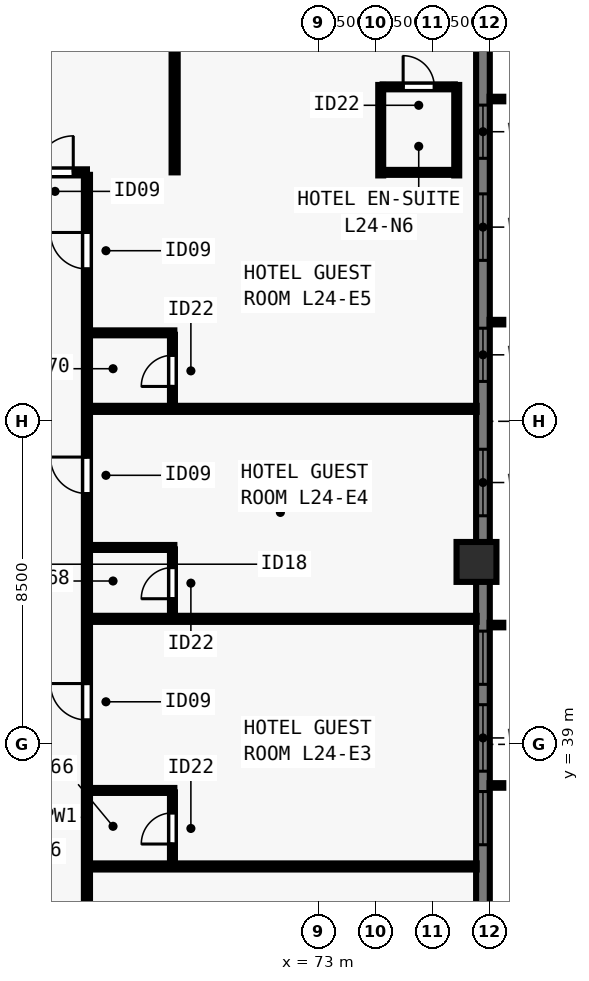
"""IFC4 building model, lengths in metres.
Left out: names, types, materials, properties, quantities, classifications, styles, units other than length and angle.
Written with IfcOpenShell. Run it as: python <this file> out.ifc"""

import sys

from ifc_helpers import new_model, si_unit, direction, frame, frame_2d, origin, origin_2d, place, context, subcontext, project, spatial, rectangle, extrude, element, fill, save


model = new_model("IFC4")
c1 = context("Model", 3, precision=1e-05, world=origin(), true_north=direction((0.0, 1.0)))
c2 = subcontext(c1, "Body", "Model", "MODEL_VIEW")
j1 = project(units=[si_unit("LENGTHUNIT", "METRE"), si_unit("PLANEANGLEUNIT", "RADIAN")], contexts=[c1])
p1 = place(None, origin())
s1 = spatial("IfcSite", under=j1, at=p1, CompositionType="ELEMENT")
p2 = place(p1, origin())
s2 = spatial("IfcBuilding", under=s1, at=p2, CompositionType="ELEMENT")
p3 = place(p2, frame((0.0, 0.0, 90.0)))
s3 = spatial("IfcBuildingStorey", under=s2, at=p3, CompositionType="ELEMENT", Elevation=90.0)
p4 = place(p3, frame((77.15, 43.8, 0.0), z_axis=(0.0, 0.0, 1.0), x_axis=(0.0, 1.0, 0.0)))
e1 = element("IfcColumn", 1, at=p4, inside=s3, PredefinedType="COLUMN", context=c2, shape_type="SweptSolid", body=[
    extrude(rectangle(XDim=1.05, YDim=1.05, at=origin_2d()), origin(), (0.0, 0.0, 1.0), 3.5),
])
p5 = place(p3, frame((77.32, 61.5, 0.0), z_axis=(0.0, 0.0, 1.0), x_axis=(0.0, -1.0, 0.0)))
e2 = element("IfcWall", 2, at=p5, inside=s3, PredefinedType="SOLIDWALL", context=c2, shape_type="SweptSolid", body=[
    extrude(rectangle(XDim=44.662, YDim=0.36, at=frame_2d((22.331, 0.0))), origin(), (0.0, 0.0, 1.0), 3.28),
])
p6 = place(p5, frame((5.68, 0.0, 0.8)))
e3 = element("IfcOpeningElement", 3, at=p6, cuts=e2, PredefinedType="OPENING", context=c2, shape_type="SweptSolid", body=[
    extrude(rectangle(XDim=1.4, YDim=1.544, at=frame_2d((0.7, 0.772))), frame((0.0, 0.19, 0.0), z_axis=(0.0, -1.0, 0.0), x_axis=(1.0, 0.0, 0.0)), (0.0, 0.0, 1.0), 0.38),
])
p7 = place(p5, frame((8.015, 0.0, 0.8)))
e4 = element("IfcOpeningElement", 4, at=p7, cuts=e2, PredefinedType="OPENING", context=c2, shape_type="SweptSolid", body=[
    extrude(rectangle(XDim=1.75, YDim=1.544, at=frame_2d((0.875, 0.772))), frame((0.0, 0.19, 0.0), z_axis=(0.0, -1.0, 0.0), x_axis=(1.0, 0.0, 0.0)), (0.0, 0.0, 1.0), 0.38),
])
p8 = place(p5, frame((11.551, 0.0, 0.8)))
e5 = element("IfcOpeningElement", 5, at=p8, cuts=e2, PredefinedType="OPENING", context=c2, shape_type="SweptSolid", body=[
    extrude(rectangle(XDim=1.4, YDim=1.544, at=frame_2d((0.7, 0.772))), frame((0.0, 0.19, 0.0), z_axis=(0.0, -1.0, 0.0), x_axis=(1.0, 0.0, 0.0)), (0.0, 0.0, 1.0), 0.38),
])
p9 = place(p5, frame((14.736, 0.0, 0.8)))
e6 = element("IfcOpeningElement", 6, at=p9, cuts=e2, PredefinedType="OPENING", context=c2, shape_type="SweptSolid", body=[
    extrude(rectangle(XDim=1.75, YDim=1.544, at=frame_2d((0.875, 0.772))), frame((0.0, 0.19, 0.0), z_axis=(0.0, -1.0, 0.0), x_axis=(1.0, 0.0, 0.0)), (0.0, 0.0, 1.0), 0.38),
])
p10 = place(p5, frame((19.521, 0.0, 0.8)))
e7 = element("IfcOpeningElement", 7, at=p10, cuts=e2, PredefinedType="OPENING", context=c2, shape_type="SweptSolid", body=[
    extrude(rectangle(XDim=1.4, YDim=1.544, at=frame_2d((0.7, 0.772))), frame((0.0, 0.19, 0.0), z_axis=(0.0, -1.0, 0.0), x_axis=(1.0, 0.0, 0.0)), (0.0, 0.0, 1.0), 0.38),
])
p11 = place(p5, frame((21.456, 0.0, 0.8)))
e8 = element("IfcOpeningElement", 8, at=p11, cuts=e2, PredefinedType="OPENING", context=c2, shape_type="SweptSolid", body=[
    extrude(rectangle(XDim=1.75, YDim=1.544, at=frame_2d((0.875, 0.772))), frame((0.0, 0.19, 0.0), z_axis=(0.0, -1.0, 0.0), x_axis=(1.0, 0.0, 0.0)), (0.0, 0.0, 1.0), 0.38),
])
p12 = place(p5, frame((23.741, 0.0, 0.8)))
e9 = element("IfcOpeningElement", 9, at=p12, cuts=e2, PredefinedType="OPENING", context=c2, shape_type="SweptSolid", body=[
    extrude(rectangle(XDim=1.4, YDim=1.544, at=frame_2d((0.7, 0.772))), frame((0.0, 0.19, 0.0), z_axis=(0.0, -1.0, 0.0), x_axis=(1.0, 0.0, 0.0)), (0.0, 0.0, 1.0), 0.38),
])
p13 = place(p5, frame((28.177, 0.0, 0.8)))
e10 = element("IfcOpeningElement", 10, at=p13, cuts=e2, PredefinedType="OPENING", context=c2, shape_type="SweptSolid", body=[
    extrude(rectangle(XDim=1.75, YDim=1.544, at=frame_2d((0.875, 0.772))), frame((0.0, 0.19, 0.0), z_axis=(0.0, -1.0, 0.0), x_axis=(1.0, 0.0, 0.0)), (0.0, 0.0, 1.0), 0.38),
])
p14 = place(p5, frame((31.711, 0.0, 0.8)))
e11 = element("IfcOpeningElement", 11, at=p14, cuts=e2, PredefinedType="OPENING", context=c2, shape_type="SweptSolid", body=[
    extrude(rectangle(XDim=1.4, YDim=1.544, at=frame_2d((0.7, 0.772))), frame((0.0, 0.19, 0.0), z_axis=(0.0, -1.0, 0.0), x_axis=(1.0, 0.0, 0.0)), (0.0, 0.0, 1.0), 0.38),
])
p15 = place(p5, frame((34.897, 0.0, 0.8)))
e12 = element("IfcOpeningElement", 12, at=p15, cuts=e2, PredefinedType="OPENING", context=c2, shape_type="SweptSolid", body=[
    extrude(rectangle(XDim=1.75, YDim=1.544, at=frame_2d((0.875, 0.772))), frame((0.0, 0.19, 0.0), z_axis=(0.0, -1.0, 0.0), x_axis=(1.0, 0.0, 0.0)), (0.0, 0.0, 1.0), 0.38),
])
p16 = place(p5, frame((38.432, 0.0, 0.8)))
e13 = element("IfcOpeningElement", 13, at=p16, cuts=e2, PredefinedType="OPENING", context=c2, shape_type="SweptSolid", body=[
    extrude(rectangle(XDim=1.4, YDim=1.544, at=frame_2d((0.7, 0.772))), frame((0.0, 0.19, 0.0), z_axis=(0.0, -1.0, 0.0), x_axis=(1.0, 0.0, 0.0)), (0.0, 0.0, 1.0), 0.38),
])
p17 = place(p3, frame((37.1, 54.05, 0.0), z_axis=(0.0, 0.0, 1.0), x_axis=(1.0, 0.0, 0.0)))
e14 = element("IfcWall", 14, at=p17, inside=s3, PredefinedType="PARTITIONING", context=c2, shape_type="SweptSolid", body=[
    extrude(rectangle(XDim=29.8, YDim=0.16, at=frame_2d((14.9, 0.0))), origin(), (0.0, 0.0, 1.0), 3.28),
])
p18 = place(p17, frame((0.91, 0.0, 0.0)))
e15 = element("IfcOpeningElement", 15, at=p18, cuts=e14, PredefinedType="OPENING", context=c2, shape_type="SweptSolid", body=[
    extrude(rectangle(XDim=0.96, YDim=2.15, at=frame_2d((0.48, 1.075))), frame((0.0, 0.09, 0.0), z_axis=(0.0, -1.0, 0.0), x_axis=(1.0, 0.0, 0.0)), (0.0, 0.0, 1.0), 0.18),
])
p19 = place(p17, frame((3.03, 0.0, 0.0)))
e16 = element("IfcOpeningElement", 16, at=p19, cuts=e14, PredefinedType="OPENING", context=c2, shape_type="SweptSolid", body=[
    extrude(rectangle(XDim=0.96, YDim=2.15, at=frame_2d((0.48, 1.075))), frame((0.0, 0.09, 0.0), z_axis=(0.0, -1.0, 0.0), x_axis=(1.0, 0.0, 0.0)), (0.0, 0.0, 1.0), 0.18),
])
p20 = place(p17, frame((11.39, 0.0, 0.0)))
e17 = element("IfcOpeningElement", 17, at=p20, cuts=e14, PredefinedType="OPENING", context=c2, shape_type="SweptSolid", body=[
    extrude(rectangle(XDim=0.96, YDim=2.15, at=frame_2d((0.48, 1.075))), frame((0.0, 0.09, 0.0), z_axis=(0.0, -1.0, 0.0), x_axis=(1.0, 0.0, 0.0)), (0.0, 0.0, 1.0), 0.18),
])
p21 = place(p17, frame((19.75, 0.0, 0.0)))
e18 = element("IfcOpeningElement", 18, at=p21, cuts=e14, PredefinedType="OPENING", context=c2, shape_type="SweptSolid", body=[
    extrude(rectangle(XDim=0.96, YDim=2.15, at=frame_2d((0.48, 1.075))), frame((0.0, 0.09, 0.0), z_axis=(0.0, -1.0, 0.0), x_axis=(1.0, 0.0, 0.0)), (0.0, 0.0, 1.0), 0.18),
])
p22 = place(p17, frame((26.931, 0.0, 0.0)))
e19 = element("IfcOpeningElement", 19, at=p22, cuts=e14, PredefinedType="OPENING", context=c2, shape_type="SweptSolid", body=[
    extrude(rectangle(XDim=0.96, YDim=2.15, at=frame_2d((0.48, 1.075))), frame((0.0, 0.09, 0.0), z_axis=(0.0, -1.0, 0.0), x_axis=(1.0, 0.0, 0.0)), (0.0, 0.0, 1.0), 0.18),
])
p23 = place(p17, frame((28.48, 0.0, 0.0)))
e20 = element("IfcOpeningElement", 20, at=p23, cuts=e14, PredefinedType="OPENING", context=c2, shape_type="SweptSolid", body=[
    extrude(rectangle(XDim=0.96, YDim=2.15, at=frame_2d((0.48, 1.075))), frame((0.0, 0.09, 0.0), z_axis=(0.0, -1.0, 0.0), x_axis=(1.0, 0.0, 0.0)), (0.0, 0.0, 1.0), 0.18),
])
p24 = place(p3, frame((66.9, 24.015, 0.0), z_axis=(0.0, 0.0, 1.0), x_axis=(0.0, 1.0, 0.0)))
e21 = element("IfcWall", 21, at=p24, inside=s3, PredefinedType="PARTITIONING", context=c2, shape_type="SweptSolid", body=[
    extrude(rectangle(XDim=29.97, YDim=0.16, at=frame_2d((14.985, 0.0))), origin(), (0.0, 0.0, 1.0), 3.28),
])
p25 = place(p24, frame((3.911, 0.0, 0.0)))
e22 = element("IfcOpeningElement", 22, at=p25, cuts=e21, PredefinedType="OPENING", context=c2, shape_type="SweptSolid", body=[
    extrude(rectangle(XDim=0.96, YDim=2.15, at=frame_2d((0.48, 1.075))), frame((0.0, 0.09, 0.0), z_axis=(0.0, -1.0, 0.0), x_axis=(1.0, 0.0, 0.0)), (0.0, 0.0, 1.0), 0.18),
])
p26 = place(p24, frame((9.544, 0.0, 0.0)))
e23 = element("IfcOpeningElement", 23, at=p26, cuts=e21, PredefinedType="OPENING", context=c2, shape_type="SweptSolid", body=[
    extrude(rectangle(XDim=0.96, YDim=2.15, at=frame_2d((0.48, 1.075))), frame((0.0, 0.09, 0.0), z_axis=(0.0, -1.0, 0.0), x_axis=(1.0, 0.0, 0.0)), (0.0, 0.0, 1.0), 0.18),
])
p27 = place(p24, frame((15.625, 0.0, 0.0)))
e24 = element("IfcOpeningElement", 24, at=p27, cuts=e21, PredefinedType="OPENING", context=c2, shape_type="SweptSolid", body=[
    extrude(rectangle(XDim=0.96, YDim=2.15, at=frame_2d((0.48, 1.075))), frame((0.0, 0.09, 0.0), z_axis=(0.0, -1.0, 0.0), x_axis=(1.0, 0.0, 0.0)), (0.0, 0.0, 1.0), 0.18),
])
p28 = place(p24, frame((21.584, 0.0, 0.0)))
e25 = element("IfcOpeningElement", 25, at=p28, cuts=e21, PredefinedType="OPENING", context=c2, shape_type="SweptSolid", body=[
    extrude(rectangle(XDim=0.96, YDim=2.15, at=frame_2d((0.48, 1.075))), frame((0.0, 0.09, 0.0), z_axis=(0.0, -1.0, 0.0), x_axis=(1.0, 0.0, 0.0)), (0.0, 0.0, 1.0), 0.18),
])
p29 = place(p24, frame((27.494, 0.0, 0.0)))
e26 = element("IfcOpeningElement", 26, at=p29, cuts=e21, PredefinedType="OPENING", context=c2, shape_type="SweptSolid", body=[
    extrude(rectangle(XDim=0.96, YDim=2.15, at=frame_2d((0.48, 1.075))), frame((0.0, 0.09, 0.0), z_axis=(0.0, -1.0, 0.0), x_axis=(1.0, 0.0, 0.0)), (0.0, 0.0, 1.0), 0.18),
])
p30 = place(p3, frame((69.208, 54.05, 0.0), z_axis=(0.0, 0.0, 1.0), x_axis=(0.0, 1.0, 0.0)))
e27 = element("IfcWall", 27, at=p30, inside=s3, PredefinedType="PARTITIONING", context=c2, shape_type="SweptSolid", body=[
    extrude(rectangle(XDim=10.105, YDim=0.16, at=frame_2d((5.052, 0.0))), origin(), (0.0, 0.0, 1.0), 2.439),
])
for number, where, z_axis, x_axis in (
    (28, (76.63, 53.97, 0.0), (0.0, 0.0, 1.0), (0.0, 1.0, 0.0)),
    (29, (74.63, 53.97, 0.0), (0.0, 0.0, 1.0), (0.0, 1.0, 0.0)),
):
    element("IfcWall", number, at=place(p3, frame(where, z_axis=z_axis, x_axis=x_axis)), inside=s3, PredefinedType="PLUMBINGWALL", context=c2, shape_type="SweptSolid", body=[
        extrude(rectangle(XDim=2.38, YDim=0.13, at=frame_2d((1.19, 0.0))), origin(), (0.0, 0.0, 1.0), 3.28),
    ])
p31 = place(p3, frame((74.68, 56.3, 0.0), z_axis=(0.0, 0.0, 1.0), x_axis=(1.0, 0.0, 0.0)))
e30 = element("IfcWall", 30, at=p31, inside=s3, PredefinedType="PLUMBINGWALL", context=c2, shape_type="SweptSolid", body=[
    extrude(rectangle(XDim=1.9, YDim=0.13, at=frame_2d((0.95, 0.0))), origin(), (0.0, 0.0, 1.0), 3.28),
])
p32 = place(p31, frame((0.54, 0.0, 0.0)))
e31 = element("IfcOpeningElement", 31, at=p32, cuts=e30, PredefinedType="OPENING", context=c2, shape_type="SweptSolid", body=[
    extrude(rectangle(XDim=0.82, YDim=2.1, at=frame_2d((0.41, 1.05))), frame((0.0, 0.075, 0.0), z_axis=(0.0, -1.0, 0.0), x_axis=(1.0, 0.0, 0.0)), (0.0, 0.0, 1.0), 0.15),
])
p33 = place(p3, frame((74.68, 54.05, 0.0), z_axis=(0.0, 0.0, 1.0), x_axis=(1.0, 0.0, 0.0)))
e32 = element("IfcWall", 32, at=p33, inside=s3, PredefinedType="PLUMBINGWALL", context=c2, shape_type="SweptSolid", body=[
    extrude(rectangle(XDim=1.9, YDim=0.13, at=frame_2d((0.95, 0.0))), origin(), (0.0, 0.0, 1.0), 3.28),
])
p34 = place(p3, frame((66.965, 35.788, 0.0), z_axis=(0.0, 0.0, 1.0), x_axis=(1.0, 0.0, 0.0)))
e33 = element("IfcWall", 33, at=p34, inside=s3, PredefinedType="PARTITIONING", context=c2, shape_type="SweptSolid", body=[
    extrude(rectangle(XDim=10.19, YDim=0.16, at=frame_2d((5.095, 0.0))), origin(), (0.0, 0.0, 1.0), 3.28),
])
p35 = place(p3, frame((66.965, 37.788, 0.0), z_axis=(0.0, 0.0, 1.0), x_axis=(1.0, 0.0, 0.0)))
e34 = element("IfcWall", 34, at=p35, inside=s3, PredefinedType="PLUMBINGWALL", context=c2, shape_type="SweptSolid", body=[
    extrude(rectangle(XDim=2.235, YDim=0.13, at=frame_2d((1.117, 0.0))), origin(), (0.0, 0.0, 1.0), 3.28),
])
p36 = place(p3, frame((69.15, 35.853, 0.0), z_axis=(0.0, 0.0, 1.0), x_axis=(0.0, 1.0, 0.0)))
e35 = element("IfcWall", 35, at=p36, inside=s3, PredefinedType="PLUMBINGWALL", context=c2, shape_type="SweptSolid", body=[
    extrude(rectangle(XDim=1.885, YDim=0.13, at=frame_2d((0.942, 0.0))), origin(), (0.0, 0.0, 1.0), 3.28),
])
p37 = place(p36, frame((0.525, 0.0, 0.0)))
e36 = element("IfcOpeningElement", 36, at=p37, cuts=e35, PredefinedType="OPENING", context=c2, shape_type="SweptSolid", body=[
    extrude(rectangle(XDim=0.82, YDim=2.1, at=frame_2d((0.41, 1.05))), frame((0.0, 0.075, 0.0), z_axis=(0.0, -1.0, 0.0), x_axis=(1.0, 0.0, 0.0)), (0.0, 0.0, 1.0), 0.15),
])
p38 = place(p3, frame((66.965, 42.302, 0.0), z_axis=(0.0, 0.0, 1.0), x_axis=(1.0, 0.0, 0.0)))
e37 = element("IfcWall", 37, at=p38, inside=s3, PredefinedType="PARTITIONING", context=c2, shape_type="SweptSolid", body=[
    extrude(rectangle(XDim=10.19, YDim=0.16, at=frame_2d((5.095, 0.0))), origin(), (0.0, 0.0, 1.0), 3.28),
])
p39 = place(p3, frame((66.965, 44.181, 0.0), z_axis=(0.0, 0.0, 1.0), x_axis=(1.0, 0.0, 0.0)))
e38 = element("IfcWall", 38, at=p39, inside=s3, PredefinedType="PLUMBINGWALL", context=c2, shape_type="SweptSolid", body=[
    extrude(rectangle(XDim=2.235, YDim=0.13, at=frame_2d((1.117, 0.0))), origin(), (0.0, 0.0, 1.0), 3.28),
])
p40 = place(p3, frame((69.15, 42.367, 0.0), z_axis=(0.0, 0.0, 1.0), x_axis=(0.0, 1.0, 0.0)))
e39 = element("IfcWall", 39, at=p40, inside=s3, PredefinedType="PLUMBINGWALL", context=c2, shape_type="SweptSolid", body=[
    extrude(rectangle(XDim=1.764, YDim=0.13, at=frame_2d((0.882, 0.0))), origin(), (0.0, 0.0, 1.0), 3.28),
])
p41 = place(p40, frame((0.464, 0.0, 0.0)))
e40 = element("IfcOpeningElement", 40, at=p41, cuts=e39, PredefinedType="OPENING", context=c2, shape_type="SweptSolid", body=[
    extrude(rectangle(XDim=0.82, YDim=2.1, at=frame_2d((0.41, 1.05))), frame((0.0, 0.075, 0.0), z_axis=(0.0, -1.0, 0.0), x_axis=(1.0, 0.0, 0.0)), (0.0, 0.0, 1.0), 0.15),
])
p42 = place(p3, frame((66.965, 47.827, 0.0), z_axis=(0.0, 0.0, 1.0), x_axis=(1.0, 0.0, 0.0)))
e41 = element("IfcWall", 41, at=p42, inside=s3, PredefinedType="PARTITIONING", context=c2, shape_type="SweptSolid", body=[
    extrude(rectangle(XDim=10.19, YDim=0.16, at=frame_2d((5.095, 0.0))), origin(), (0.0, 0.0, 1.0), 3.28),
])
p43 = place(p3, frame((66.965, 49.827, 0.0), z_axis=(0.0, 0.0, 1.0), x_axis=(1.0, 0.0, 0.0)))
e42 = element("IfcWall", 42, at=p43, inside=s3, PredefinedType="PLUMBINGWALL", context=c2, shape_type="SweptSolid", body=[
    extrude(rectangle(XDim=2.235, YDim=0.13, at=frame_2d((1.117, 0.0))), origin(), (0.0, 0.0, 1.0), 3.28),
])
p44 = place(p3, frame((69.15, 47.893, 0.0), z_axis=(0.0, 0.0, 1.0), x_axis=(0.0, 1.0, 0.0)))
e43 = element("IfcWall", 43, at=p44, inside=s3, PredefinedType="PLUMBINGWALL", context=c2, shape_type="SweptSolid", body=[
    extrude(rectangle(XDim=1.885, YDim=0.13, at=frame_2d((0.942, 0.0))), origin(), (0.0, 0.0, 1.0), 3.28),
])
p45 = place(p44, frame((0.525, 0.0, 0.0)))
e44 = element("IfcOpeningElement", 44, at=p45, cuts=e43, PredefinedType="OPENING", context=c2, shape_type="SweptSolid", body=[
    extrude(rectangle(XDim=0.82, YDim=2.1, at=frame_2d((0.41, 1.05))), frame((0.0, 0.075, 0.0), z_axis=(0.0, -1.0, 0.0), x_axis=(1.0, 0.0, 0.0)), (0.0, 0.0, 1.0), 0.15),
])
p46 = place(p6, origin())
e45 = element("IfcWindow", 45, at=p46, inside=s3, PartitioningType="SINGLE_PANEL", PredefinedType="WINDOW", context=c2, shape_type="SweptSolid", body=[
    extrude(rectangle(XDim=1.4, YDim=1.544, at=frame_2d((0.7, 0.772))), frame((0.0, -0.05, 0.0), z_axis=(0.0, -1.0, 0.0), x_axis=(1.0, 0.0, 0.0)), (0.0, 0.0, 1.0), 0.06),
])
fill(e3, e45)
p47 = place(p7, origin())
e46 = element("IfcWindow", 46, at=p47, inside=s3, PartitioningType="SINGLE_PANEL", PredefinedType="WINDOW", context=c2, shape_type="SweptSolid", body=[
    extrude(rectangle(XDim=1.75, YDim=1.544, at=frame_2d((0.875, 0.772))), frame((0.0, -0.05, 0.0), z_axis=(0.0, -1.0, 0.0), x_axis=(1.0, 0.0, 0.0)), (0.0, 0.0, 1.0), 0.06),
])
fill(e4, e46)
p48 = place(p8, origin())
e47 = element("IfcWindow", 47, at=p48, inside=s3, PartitioningType="SINGLE_PANEL", PredefinedType="WINDOW", context=c2, shape_type="SweptSolid", body=[
    extrude(rectangle(XDim=1.4, YDim=1.544, at=frame_2d((0.7, 0.772))), frame((0.0, -0.05, 0.0), z_axis=(0.0, -1.0, 0.0), x_axis=(1.0, 0.0, 0.0)), (0.0, 0.0, 1.0), 0.06),
])
fill(e5, e47)
p49 = place(p9, origin())
e48 = element("IfcWindow", 48, at=p49, inside=s3, PartitioningType="SINGLE_PANEL", PredefinedType="WINDOW", context=c2, shape_type="SweptSolid", body=[
    extrude(rectangle(XDim=1.75, YDim=1.544, at=frame_2d((0.875, 0.772))), frame((0.0, -0.05, 0.0), z_axis=(0.0, -1.0, 0.0), x_axis=(1.0, 0.0, 0.0)), (0.0, 0.0, 1.0), 0.06),
])
fill(e6, e48)
p50 = place(p10, origin())
e49 = element("IfcWindow", 49, at=p50, inside=s3, PartitioningType="SINGLE_PANEL", PredefinedType="WINDOW", context=c2, shape_type="SweptSolid", body=[
    extrude(rectangle(XDim=1.4, YDim=1.544, at=frame_2d((0.7, 0.772))), frame((0.0, -0.05, 0.0), z_axis=(0.0, -1.0, 0.0), x_axis=(1.0, 0.0, 0.0)), (0.0, 0.0, 1.0), 0.06),
])
fill(e7, e49)
p51 = place(p11, origin())
e50 = element("IfcWindow", 50, at=p51, inside=s3, PartitioningType="SINGLE_PANEL", PredefinedType="WINDOW", context=c2, shape_type="SweptSolid", body=[
    extrude(rectangle(XDim=1.75, YDim=1.544, at=frame_2d((0.875, 0.772))), frame((0.0, -0.05, 0.0), z_axis=(0.0, -1.0, 0.0), x_axis=(1.0, 0.0, 0.0)), (0.0, 0.0, 1.0), 0.06),
])
fill(e8, e50)
p52 = place(p12, origin())
e51 = element("IfcWindow", 51, at=p52, inside=s3, PartitioningType="SINGLE_PANEL", PredefinedType="WINDOW", context=c2, shape_type="SweptSolid", body=[
    extrude(rectangle(XDim=1.4, YDim=1.544, at=frame_2d((0.7, 0.772))), frame((0.0, -0.05, 0.0), z_axis=(0.0, -1.0, 0.0), x_axis=(1.0, 0.0, 0.0)), (0.0, 0.0, 1.0), 0.06),
])
fill(e9, e51)
p53 = place(p32, origin())
e52 = element("IfcDoor", 52, at=p53, inside=s3, OperationType="SINGLE_SWING_LEFT", PredefinedType="DOOR", context=c2, shape_type="SweptSolid", body=[
    extrude(rectangle(XDim=0.82, YDim=2.1, at=frame_2d((0.41, 1.05))), frame((0.0, 0.025, 0.0), z_axis=(0.0, -1.0, 0.0), x_axis=(1.0, 0.0, 0.0)), (0.0, 0.0, 1.0), 0.05),
])
fill(e31, e52)
p54 = place(p23, origin())
e53 = element("IfcDoor", 53, at=p54, inside=s3, OperationType="SINGLE_SWING_RIGHT", PredefinedType="DOOR", context=c2, shape_type="SweptSolid", body=[
    extrude(rectangle(XDim=0.96, YDim=2.15, at=frame_2d((0.48, 1.075))), frame((0.0, 0.025, 0.0), z_axis=(0.0, -1.0, 0.0), x_axis=(1.0, 0.0, 0.0)), (0.0, 0.0, 1.0), 0.05),
])
fill(e20, e53)
p55 = place(p37, origin())
e54 = element("IfcDoor", 54, at=p55, inside=s3, OperationType="SINGLE_SWING_LEFT", PredefinedType="DOOR", context=c2, shape_type="SweptSolid", body=[
    extrude(rectangle(XDim=0.82, YDim=2.1, at=frame_2d((0.41, 1.05))), frame((0.0, 0.025, 0.0), z_axis=(0.0, -1.0, 0.0), x_axis=(1.0, 0.0, 0.0)), (0.0, 0.0, 1.0), 0.05),
])
fill(e36, e54)
p56 = place(p27, origin())
e55 = element("IfcDoor", 55, at=p56, inside=s3, OperationType="SINGLE_SWING_RIGHT", PredefinedType="DOOR", context=c2, shape_type="SweptSolid", body=[
    extrude(rectangle(XDim=0.96, YDim=2.15, at=frame_2d((0.48, 1.075))), frame((0.0, 0.025, 0.0), z_axis=(0.0, -1.0, 0.0), x_axis=(1.0, 0.0, 0.0)), (0.0, 0.0, 1.0), 0.05),
])
fill(e24, e55)
p57 = place(p41, origin())
e56 = element("IfcDoor", 56, at=p57, inside=s3, OperationType="SINGLE_SWING_LEFT", PredefinedType="DOOR", context=c2, shape_type="SweptSolid", body=[
    extrude(rectangle(XDim=0.82, YDim=2.1, at=frame_2d((0.41, 1.05))), frame((0.0, 0.025, 0.0), z_axis=(0.0, -1.0, 0.0), x_axis=(1.0, 0.0, 0.0)), (0.0, 0.0, 1.0), 0.05),
])
fill(e40, e56)
p58 = place(p28, origin())
e57 = element("IfcDoor", 57, at=p58, inside=s3, OperationType="SINGLE_SWING_RIGHT", PredefinedType="DOOR", context=c2, shape_type="SweptSolid", body=[
    extrude(rectangle(XDim=0.96, YDim=2.15, at=frame_2d((0.48, 1.075))), frame((0.0, 0.025, 0.0), z_axis=(0.0, -1.0, 0.0), x_axis=(1.0, 0.0, 0.0)), (0.0, 0.0, 1.0), 0.05),
])
fill(e25, e57)
p59 = place(p45, origin())
e58 = element("IfcDoor", 58, at=p59, inside=s3, OperationType="SINGLE_SWING_LEFT", PredefinedType="DOOR", context=c2, shape_type="SweptSolid", body=[
    extrude(rectangle(XDim=0.82, YDim=2.1, at=frame_2d((0.41, 1.05))), frame((0.0, 0.025, 0.0), z_axis=(0.0, -1.0, 0.0), x_axis=(1.0, 0.0, 0.0)), (0.0, 0.0, 1.0), 0.05),
])
fill(e44, e58)
p60 = place(p29, origin())
e59 = element("IfcDoor", 59, at=p60, inside=s3, OperationType="SINGLE_SWING_RIGHT", PredefinedType="DOOR", context=c2, shape_type="SweptSolid", body=[
    extrude(rectangle(XDim=0.96, YDim=2.15, at=frame_2d((0.48, 1.075))), frame((0.0, 0.025, 0.0), z_axis=(0.0, -1.0, 0.0), x_axis=(1.0, 0.0, 0.0)), (0.0, 0.0, 1.0), 0.05),
])
fill(e26, e59)
save(model, sys.argv[1])
